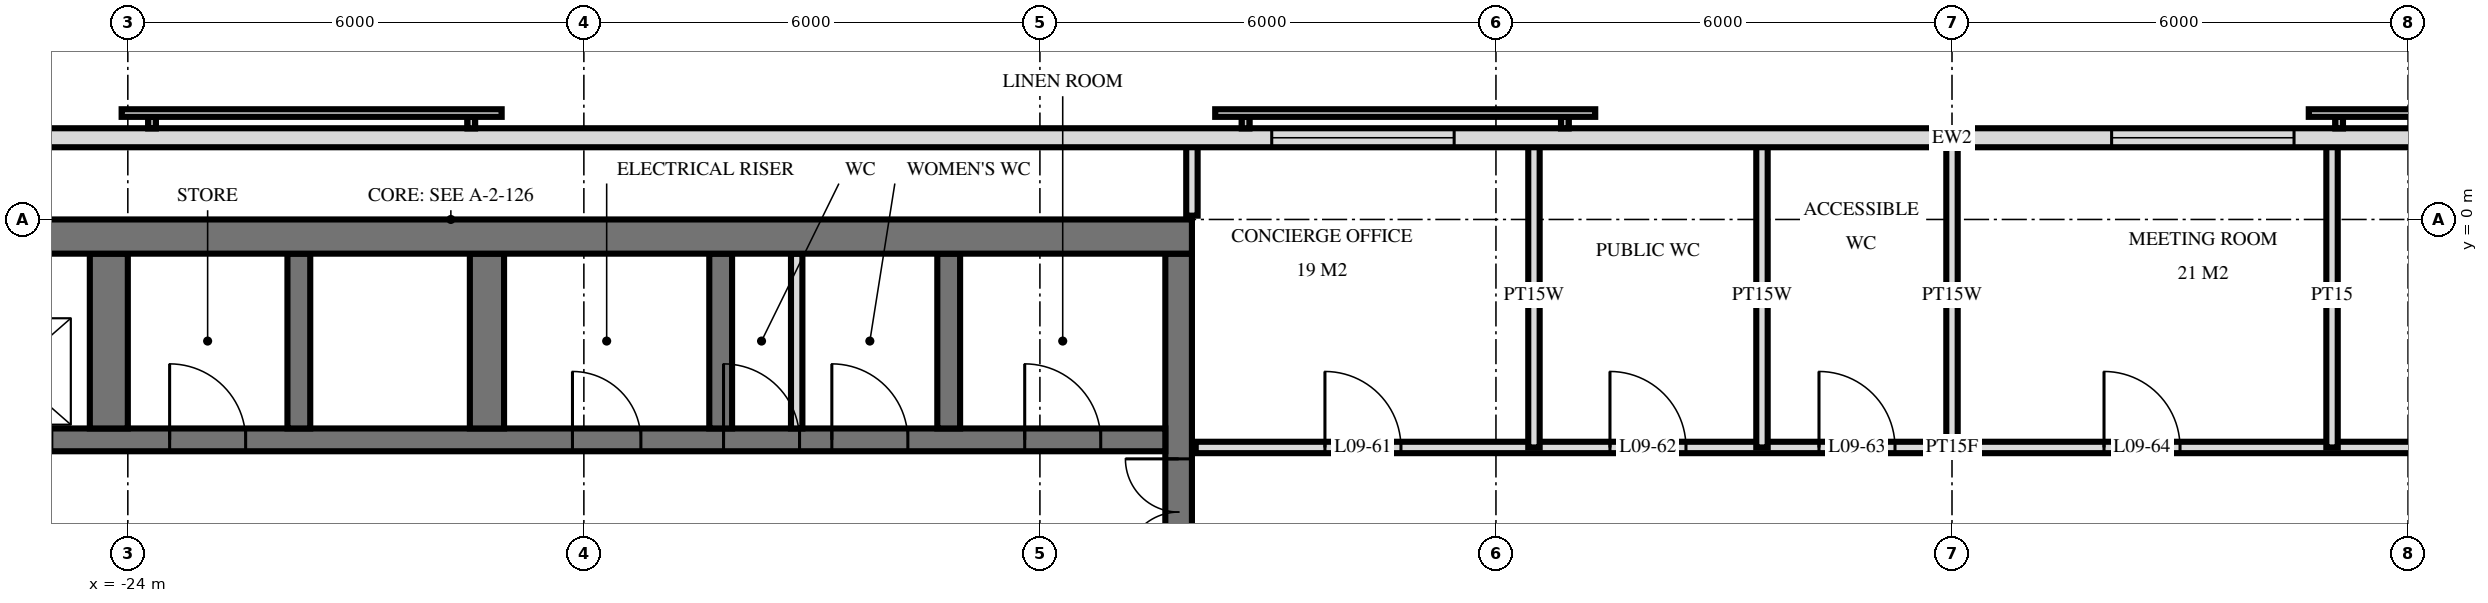
"""IFC4 building model, lengths in metres.
Left out: names, types, materials, properties, quantities, classifications, styles, units other than length and angle.
Written with IfcOpenShell. Run it as: python <this file> out.ifc"""

import sys

from ifc_helpers import new_model, si_unit, direction, frame, frame_2d, origin, place, context, subcontext, project, spatial, rectangle, extrude, element, fill, save


model = new_model("IFC4")
c1 = context("Model", 3, precision=1e-05, world=origin(), true_north=direction((0.0, 1.0)))
c2 = subcontext(c1, "Body", "Model", "MODEL_VIEW")
j1 = project(units=[si_unit("LENGTHUNIT", "METRE"), si_unit("PLANEANGLEUNIT", "RADIAN")], contexts=[c1])
p1 = place(None, origin())
s1 = spatial("IfcSite", under=j1, at=p1, CompositionType="ELEMENT")
p2 = place(p1, origin())
s2 = spatial("IfcBuilding", under=s1, at=p2, CompositionType="ELEMENT")
p3 = place(p2, frame((0.0, 0.0, 42.0)))
s3 = spatial("IfcBuildingStorey", under=s2, at=p3, CompositionType="ELEMENT", Elevation=42.0)
p4 = place(p3, frame((-29.5, -0.225, 0.0), z_axis=(0.0, 0.0, 1.0), x_axis=(1.0, 0.0, 0.0)))
e1 = element("IfcWall", 1, at=p4, inside=s3, PredefinedType="SHEAR", context=c2, shape_type="SweptSolid", body=[
    extrude(rectangle(XDim=19.5, YDim=0.45, at=frame_2d((9.75, 0.0))), origin(), (0.0, 0.0, 1.0), 3.6),
])
p5 = place(p3, frame((-10.175, -14.55, 0.0), z_axis=(0.0, 0.0, 1.0), x_axis=(0.0, 1.0, 0.0)))
e2 = element("IfcWall", 2, at=p5, inside=s3, PredefinedType="SHEAR", context=c2, shape_type="SweptSolid", body=[
    extrude(rectangle(XDim=14.1, YDim=0.35, at=frame_2d((7.05, 0.0))), origin(), (0.0, 0.0, 1.0), 3.6),
])
p6 = place(p5, frame((8.4, 0.0, 0.0)))
e3 = element("IfcOpeningElement", 3, at=p6, cuts=e2, PredefinedType="OPENING", context=c2, shape_type="SweptSolid", body=[
    extrude(rectangle(XDim=1.4, YDim=2.4, at=frame_2d((0.7, 1.2))), frame((0.0, 0.185, 0.0), z_axis=(0.0, -1.0, 0.0), x_axis=(1.0, 0.0, 0.0)), (0.0, 0.0, 1.0), 0.37),
])
p7 = place(p5, frame((10.0, 0.0, 0.0)))
e4 = element("IfcOpeningElement", 4, at=p7, cuts=e2, PredefinedType="OPENING", context=c2, shape_type="SweptSolid", body=[
    extrude(rectangle(XDim=1.4, YDim=2.4, at=frame_2d((0.7, 1.2))), frame((0.0, 0.185, 0.0), z_axis=(0.0, -1.0, 0.0), x_axis=(1.0, 0.0, 0.0)), (0.0, 0.0, 1.0), 0.37),
])
p8 = place(p5, frame((4.0, 0.0, 0.0)))
e5 = element("IfcOpeningElement", 5, at=p8, cuts=e2, PredefinedType="OPENING", context=c2, shape_type="SweptSolid", body=[
    extrude(rectangle(XDim=1.2, YDim=2.1, at=frame_2d((0.6, 1.05))), frame((0.0, 0.185, 0.0), z_axis=(0.0, -1.0, 0.0), x_axis=(1.0, 0.0, 0.0)), (0.0, 0.0, 1.0), 0.37),
])
p9 = place(p3, frame((-29.05, -2.9, 0.0), z_axis=(0.0, 0.0, 1.0), x_axis=(1.0, 0.0, 0.0)))
e6 = element("IfcWall", 6, at=p9, inside=s3, PredefinedType="SHEAR", context=c2, shape_type="SweptSolid", body=[
    extrude(rectangle(XDim=18.7, YDim=0.3, at=frame_2d((9.35, 0.0))), origin(), (0.0, 0.0, 1.0), 3.6),
])
p10 = place(p9, frame((2.95, 0.0, 0.0)))
e7 = element("IfcOpeningElement", 7, at=p10, cuts=e6, PredefinedType="OPENING", context=c2, shape_type="SweptSolid", body=[
    extrude(rectangle(XDim=1.1, YDim=2.1, at=frame_2d((0.55, 1.05))), frame((0.0, 0.16, 0.0), z_axis=(0.0, -1.0, 0.0), x_axis=(1.0, 0.0, 0.0)), (0.0, 0.0, 1.0), 0.32),
])
p11 = place(p9, frame((0.55, 0.0, 0.0)))
e8 = element("IfcOpeningElement", 8, at=p11, cuts=e6, PredefinedType="OPENING", context=c2, shape_type="SweptSolid", body=[
    extrude(rectangle(XDim=1.1, YDim=2.1, at=frame_2d((0.55, 1.05))), frame((0.0, 0.16, 0.0), z_axis=(0.0, -1.0, 0.0), x_axis=(1.0, 0.0, 0.0)), (0.0, 0.0, 1.0), 0.32),
])
p12 = place(p9, frame((10.9, 0.0, 0.0)))
e9 = element("IfcOpeningElement", 9, at=p12, cuts=e6, PredefinedType="OPENING", context=c2, shape_type="SweptSolid", body=[
    extrude(rectangle(XDim=0.9, YDim=2.1, at=frame_2d((0.45, 1.05))), frame((0.0, 0.16, 0.0), z_axis=(0.0, -1.0, 0.0), x_axis=(1.0, 0.0, 0.0)), (0.0, 0.0, 1.0), 0.32),
])
p13 = place(p9, frame((16.85, 0.0, 0.0)))
e10 = element("IfcOpeningElement", 10, at=p13, cuts=e6, PredefinedType="OPENING", context=c2, shape_type="SweptSolid", body=[
    extrude(rectangle(XDim=1.0, YDim=2.1, at=frame_2d((0.5, 1.05))), frame((0.0, 0.16, 0.0), z_axis=(0.0, -1.0, 0.0), x_axis=(1.0, 0.0, 0.0)), (0.0, 0.0, 1.0), 0.32),
])
p14 = place(p9, frame((14.312, 0.0, 0.0)))
e11 = element("IfcOpeningElement", 11, at=p14, cuts=e6, PredefinedType="OPENING", context=c2, shape_type="SweptSolid", body=[
    extrude(rectangle(XDim=1.0, YDim=2.1, at=frame_2d((0.5, 1.05))), frame((0.0, 0.16, 0.0), z_axis=(0.0, -1.0, 0.0), x_axis=(1.0, 0.0, 0.0)), (0.0, 0.0, 1.0), 0.32),
])
p15 = place(p9, frame((12.887, 0.0, 0.0)))
e12 = element("IfcOpeningElement", 12, at=p15, cuts=e6, PredefinedType="OPENING", context=c2, shape_type="SweptSolid", body=[
    extrude(rectangle(XDim=1.0, YDim=2.1, at=frame_2d((0.5, 1.05))), frame((0.0, 0.16, 0.0), z_axis=(0.0, -1.0, 0.0), x_axis=(1.0, 0.0, 0.0)), (0.0, 0.0, 1.0), 0.32),
])
p16 = place(p9, frame((5.6, 0.0, 0.0)))
e13 = element("IfcOpeningElement", 13, at=p16, cuts=e6, PredefinedType="OPENING", context=c2, shape_type="SweptSolid", body=[
    extrude(rectangle(XDim=1.0, YDim=2.1, at=frame_2d((0.5, 1.05))), frame((0.0, 0.16, 0.0), z_axis=(0.0, -1.0, 0.0), x_axis=(1.0, 0.0, 0.0)), (0.0, 0.0, 1.0), 0.32),
])
for number, where, z_axis, x_axis in (
    (14, (-13.2, -2.75, 0.0), (0.0, 0.0, 1.0), (0.0, 1.0, 0.0)),
    (15, (-16.2, -2.75, 0.0), (0.0, 0.0, 1.0), (0.0, 1.0, 0.0)),
):
    element("IfcWall", number, at=place(p3, frame(where, z_axis=z_axis, x_axis=x_axis)), inside=s3, PredefinedType="SHEAR", context=c2, shape_type="SweptSolid", body=[
        extrude(rectangle(XDim=2.3, YDim=0.3, at=frame_2d((1.15, 0.0))), origin(), (0.0, 0.0, 1.0), 3.6),
    ])
p17 = place(p3, frame((-19.275, -2.75, 0.0), z_axis=(0.0, 0.0, 1.0), x_axis=(0.0, 1.0, 0.0)))
e16 = element("IfcWall", 16, at=p17, inside=s3, PredefinedType="SHEAR", context=c2, shape_type="SweptSolid", body=[
    extrude(rectangle(XDim=2.3, YDim=0.45, at=frame_2d((1.15, 0.0))), origin(), (0.0, 0.0, 1.0), 3.6),
])
p18 = place(p3, frame((-21.75, -2.75, 0.0), z_axis=(0.0, 0.0, 1.0), x_axis=(0.0, 1.0, 0.0)))
e17 = element("IfcWall", 17, at=p18, inside=s3, PredefinedType="SHEAR", context=c2, shape_type="SweptSolid", body=[
    extrude(rectangle(XDim=2.3, YDim=0.3, at=frame_2d((1.15, 0.0))), origin(), (0.0, 0.0, 1.0), 3.6),
])
p19 = place(p3, frame((-24.25, -2.75, 0.0), z_axis=(0.0, 0.0, 1.0), x_axis=(0.0, 1.0, 0.0)))
e18 = element("IfcWall", 18, at=p19, inside=s3, PredefinedType="SHEAR", context=c2, shape_type="SweptSolid", body=[
    extrude(rectangle(XDim=2.3, YDim=0.5, at=frame_2d((1.15, 0.0))), origin(), (0.0, 0.0, 1.0), 3.6),
])
p20 = place(p3, frame((28.775, 1.075, 0.0), z_axis=(0.0, 0.0, 1.0), x_axis=(-1.0, 0.0, 0.0)))
e19 = element("IfcWall", 19, at=p20, inside=s3, PredefinedType="SOLIDWALL", context=c2, shape_type="SweptSolid", body=[
    extrude(rectangle(XDim=57.551, YDim=0.25, at=frame_2d((28.775, 0.0))), origin(), (0.0, 0.0, 1.0), 3.32),
])
p21 = place(p20, frame((24.275, 0.0, 0.3)))
e20 = element("IfcOpeningElement", 20, at=p21, cuts=e19, PredefinedType="OPENING", context=c2, shape_type="SweptSolid", body=[
    extrude(rectangle(XDim=2.4, YDim=2.1, at=frame_2d((1.2, 1.05))), frame((0.0, 0.135, 0.0), z_axis=(0.0, -1.0, 0.0), x_axis=(1.0, 0.0, 0.0)), (0.0, 0.0, 1.0), 0.27),
])
p22 = place(p20, frame((35.325, 0.0, 0.3)))
e21 = element("IfcOpeningElement", 21, at=p22, cuts=e19, PredefinedType="OPENING", context=c2, shape_type="SweptSolid", body=[
    extrude(rectangle(XDim=2.4, YDim=2.1, at=frame_2d((1.2, 1.05))), frame((0.0, 0.135, 0.0), z_axis=(0.0, -1.0, 0.0), x_axis=(1.0, 0.0, 0.0)), (0.0, 0.0, 1.0), 0.27),
])
p23 = place(p3, frame((-15.2, -2.75, 0.0), z_axis=(0.0, 0.0, 1.0), x_axis=(0.0, 1.0, 0.0)))
e22 = element("IfcWall", 22, at=p23, inside=s3, PredefinedType="PARTITIONING", context=c2, shape_type="SweptSolid", body=[
    extrude(rectangle(XDim=2.3, YDim=0.15, at=frame_2d((1.15, 0.0))), origin(), (0.0, 0.0, 1.0), 3.3),
])
p24 = place(p3, frame((5.0, -3.0, 0.0), z_axis=(0.0, 0.0, 1.0), x_axis=(0.0, 1.0, 0.0)))
e23 = element("IfcWall", 23, at=p24, inside=s3, PredefinedType="PARTITIONING", context=c2, shape_type="SweptSolid", body=[
    extrude(rectangle(XDim=4.02, YDim=0.15, at=frame_2d((2.01, 0.0))), origin(), (0.0, 0.0, 1.0), 3.32),
])
for number, where, z_axis, x_axis in (
    (24, (0.0, -3.0, 0.0), (0.0, 0.0, 1.0), (0.0, 1.0, 0.0)),
    (25, (-2.5, -3.0, 0.0), (0.0, 0.0, 1.0), (0.0, 1.0, 0.0)),
    (26, (-5.5, -3.0, 0.0), (0.0, 0.0, 1.0), (0.0, 1.0, 0.0)),
):
    element("IfcWall", number, at=place(p3, frame(where, z_axis=z_axis, x_axis=x_axis)), inside=s3, PredefinedType="PLUMBINGWALL", context=c2, shape_type="SweptSolid", body=[
        extrude(rectangle(XDim=4.02, YDim=0.15, at=frame_2d((2.01, 0.0))), origin(), (0.0, 0.0, 1.0), 3.32),
    ])
p25 = place(p3, frame((-10.0, 0.05, 0.0), z_axis=(0.0, 0.0, 1.0), x_axis=(0.0, 1.0, 0.0)))
e27 = element("IfcWall", 27, at=p25, inside=s3, PredefinedType="PARTITIONING", context=c2, shape_type="SweptSolid", body=[
    extrude(rectangle(XDim=0.97, YDim=0.15, at=frame_2d((0.485, 0.0))), origin(), (0.0, 0.0, 1.0), 3.32),
])
p26 = place(p3, frame((-9.95, -3.0, 0.0), z_axis=(0.0, 0.0, 1.0), x_axis=(1.0, 0.0, 0.0)))
e28 = element("IfcWall", 28, at=p26, inside=s3, PredefinedType="PARTITIONING", context=c2, shape_type="SweptSolid", body=[
    extrude(rectangle(XDim=19.9, YDim=0.15, at=frame_2d((9.95, 0.0))), origin(), (0.0, 0.0, 1.0), 3.32),
])
p27 = place(p26, frame((1.7, 0.0, 0.0)))
e29 = element("IfcOpeningElement", 29, at=p27, cuts=e28, PredefinedType="OPENING", context=c2, shape_type="SweptSolid", body=[
    extrude(rectangle(XDim=1.0, YDim=2.1, at=frame_2d((0.5, 1.05))), frame((0.0, 0.085, 0.0), z_axis=(0.0, -1.0, 0.0), x_axis=(1.0, 0.0, 0.0)), (0.0, 0.0, 1.0), 0.17),
])
p28 = place(p26, frame((5.45, 0.0, 0.0)))
e30 = element("IfcOpeningElement", 30, at=p28, cuts=e28, PredefinedType="OPENING", context=c2, shape_type="SweptSolid", body=[
    extrude(rectangle(XDim=1.0, YDim=2.1, at=frame_2d((0.5, 1.05))), frame((0.0, 0.085, 0.0), z_axis=(0.0, -1.0, 0.0), x_axis=(1.0, 0.0, 0.0)), (0.0, 0.0, 1.0), 0.17),
])
p29 = place(p26, frame((8.2, 0.0, 0.0)))
e31 = element("IfcOpeningElement", 31, at=p29, cuts=e28, PredefinedType="OPENING", context=c2, shape_type="SweptSolid", body=[
    extrude(rectangle(XDim=1.0, YDim=2.1, at=frame_2d((0.5, 1.05))), frame((0.0, 0.085, 0.0), z_axis=(0.0, -1.0, 0.0), x_axis=(1.0, 0.0, 0.0)), (0.0, 0.0, 1.0), 0.17),
])
p30 = place(p26, frame((11.95, 0.0, 0.0)))
e32 = element("IfcOpeningElement", 32, at=p30, cuts=e28, PredefinedType="OPENING", context=c2, shape_type="SweptSolid", body=[
    extrude(rectangle(XDim=1.0, YDim=2.1, at=frame_2d((0.5, 1.05))), frame((0.0, 0.085, 0.0), z_axis=(0.0, -1.0, 0.0), x_axis=(1.0, 0.0, 0.0)), (0.0, 0.0, 1.0), 0.17),
])
p31 = place(p26, frame((16.95, 0.0, 0.0)))
e33 = element("IfcOpeningElement", 33, at=p31, cuts=e28, PredefinedType="OPENING", context=c2, shape_type="SweptSolid", body=[
    extrude(rectangle(XDim=1.0, YDim=2.1, at=frame_2d((0.5, 1.05))), frame((0.0, 0.085, 0.0), z_axis=(0.0, -1.0, 0.0), x_axis=(1.0, 0.0, 0.0)), (0.0, 0.0, 1.0), 0.17),
])
p32 = place(p21, origin())
e34 = element("IfcWindow", 34, at=p32, inside=s3, PartitioningType="SINGLE_PANEL", PredefinedType="WINDOW", context=c2, shape_type="SweptSolid", body=[
    extrude(rectangle(XDim=2.4, YDim=2.1, at=frame_2d((1.2, 1.05))), frame((0.0, 0.03, 0.0), z_axis=(0.0, -1.0, 0.0), x_axis=(1.0, 0.0, 0.0)), (0.0, 0.0, 1.0), 0.06),
])
fill(e20, e34)
p33 = place(p22, origin())
e35 = element("IfcWindow", 35, at=p33, inside=s3, PartitioningType="SINGLE_PANEL", PredefinedType="WINDOW", context=c2, shape_type="SweptSolid", body=[
    extrude(rectangle(XDim=2.4, YDim=2.1, at=frame_2d((1.2, 1.05))), frame((0.0, 0.03, 0.0), z_axis=(0.0, -1.0, 0.0), x_axis=(1.0, 0.0, 0.0)), (0.0, 0.0, 1.0), 0.06),
])
fill(e21, e35)
p34 = place(p7, origin())
e36 = element("IfcDoor", 36, at=p34, inside=s3, OperationType="DOUBLE_DOOR_SINGLE_SWING", PredefinedType="DOOR", context=c2, shape_type="SweptSolid", body=[
    extrude(rectangle(XDim=1.4, YDim=2.4, at=frame_2d((0.7, 1.2))), frame((0.0, 0.025, 0.0), z_axis=(0.0, -1.0, 0.0), x_axis=(1.0, 0.0, 0.0)), (0.0, 0.0, 1.0), 0.05),
])
fill(e4, e36)
p35 = place(p12, origin())
e37 = element("IfcDoor", 37, at=p35, inside=s3, OperationType="SINGLE_SWING_RIGHT", PredefinedType="DOOR", context=c2, shape_type="SweptSolid", body=[
    extrude(rectangle(XDim=0.9, YDim=2.1, at=frame_2d((0.45, 1.05))), frame((0.0, 0.025, 0.0), z_axis=(0.0, -1.0, 0.0), x_axis=(1.0, 0.0, 0.0)), (0.0, 0.0, 1.0), 0.05),
])
fill(e9, e37)
p36 = place(p13, origin())
e38 = element("IfcDoor", 38, at=p36, inside=s3, OperationType="SINGLE_SWING_RIGHT", PredefinedType="DOOR", context=c2, shape_type="SweptSolid", body=[
    extrude(rectangle(XDim=1.0, YDim=2.1, at=frame_2d((0.5, 1.05))), frame((0.0, 0.025, 0.0), z_axis=(0.0, -1.0, 0.0), x_axis=(1.0, 0.0, 0.0)), (0.0, 0.0, 1.0), 0.05),
])
fill(e10, e38)
p37 = place(p14, origin())
e39 = element("IfcDoor", 39, at=p37, inside=s3, OperationType="SINGLE_SWING_RIGHT", PredefinedType="DOOR", context=c2, shape_type="SweptSolid", body=[
    extrude(rectangle(XDim=1.0, YDim=2.1, at=frame_2d((0.5, 1.05))), frame((0.0, 0.025, 0.0), z_axis=(0.0, -1.0, 0.0), x_axis=(1.0, 0.0, 0.0)), (0.0, 0.0, 1.0), 0.05),
])
fill(e11, e39)
p38 = place(p15, origin())
e40 = element("IfcDoor", 40, at=p38, inside=s3, OperationType="SINGLE_SWING_RIGHT", PredefinedType="DOOR", context=c2, shape_type="SweptSolid", body=[
    extrude(rectangle(XDim=1.0, YDim=2.1, at=frame_2d((0.5, 1.05))), frame((0.0, 0.025, 0.0), z_axis=(0.0, -1.0, 0.0), x_axis=(1.0, 0.0, 0.0)), (0.0, 0.0, 1.0), 0.05),
])
fill(e12, e40)
p39 = place(p16, origin())
e41 = element("IfcDoor", 41, at=p39, inside=s3, OperationType="SINGLE_SWING_RIGHT", PredefinedType="DOOR", context=c2, shape_type="SweptSolid", body=[
    extrude(rectangle(XDim=1.0, YDim=2.1, at=frame_2d((0.5, 1.05))), frame((0.0, 0.025, 0.0), z_axis=(0.0, -1.0, 0.0), x_axis=(1.0, 0.0, 0.0)), (0.0, 0.0, 1.0), 0.05),
])
fill(e13, e41)
p40 = place(p27, origin())
e42 = element("IfcDoor", 42, at=p40, inside=s3, OperationType="SINGLE_SWING_RIGHT", PredefinedType="DOOR", context=c2, shape_type="SweptSolid", body=[
    extrude(rectangle(XDim=1.0, YDim=2.1, at=frame_2d((0.5, 1.05))), frame((0.0, 0.025, 0.0), z_axis=(0.0, -1.0, 0.0), x_axis=(1.0, 0.0, 0.0)), (0.0, 0.0, 1.0), 0.05),
])
fill(e29, e42)
p41 = place(p28, origin())
e43 = element("IfcDoor", 43, at=p41, inside=s3, OperationType="SINGLE_SWING_RIGHT", PredefinedType="DOOR", context=c2, shape_type="SweptSolid", body=[
    extrude(rectangle(XDim=1.0, YDim=2.1, at=frame_2d((0.5, 1.05))), frame((0.0, 0.025, 0.0), z_axis=(0.0, -1.0, 0.0), x_axis=(1.0, 0.0, 0.0)), (0.0, 0.0, 1.0), 0.05),
])
fill(e30, e43)
p42 = place(p29, origin())
e44 = element("IfcDoor", 44, at=p42, inside=s3, OperationType="SINGLE_SWING_RIGHT", PredefinedType="DOOR", context=c2, shape_type="SweptSolid", body=[
    extrude(rectangle(XDim=1.0, YDim=2.1, at=frame_2d((0.5, 1.05))), frame((0.0, 0.025, 0.0), z_axis=(0.0, -1.0, 0.0), x_axis=(1.0, 0.0, 0.0)), (0.0, 0.0, 1.0), 0.05),
])
fill(e31, e44)
p43 = place(p30, origin())
e45 = element("IfcDoor", 45, at=p43, inside=s3, OperationType="SINGLE_SWING_RIGHT", PredefinedType="DOOR", context=c2, shape_type="SweptSolid", body=[
    extrude(rectangle(XDim=1.0, YDim=2.1, at=frame_2d((0.5, 1.05))), frame((0.0, 0.025, 0.0), z_axis=(0.0, -1.0, 0.0), x_axis=(1.0, 0.0, 0.0)), (0.0, 0.0, 1.0), 0.05),
])
fill(e32, e45)
save(model, sys.argv[1])
